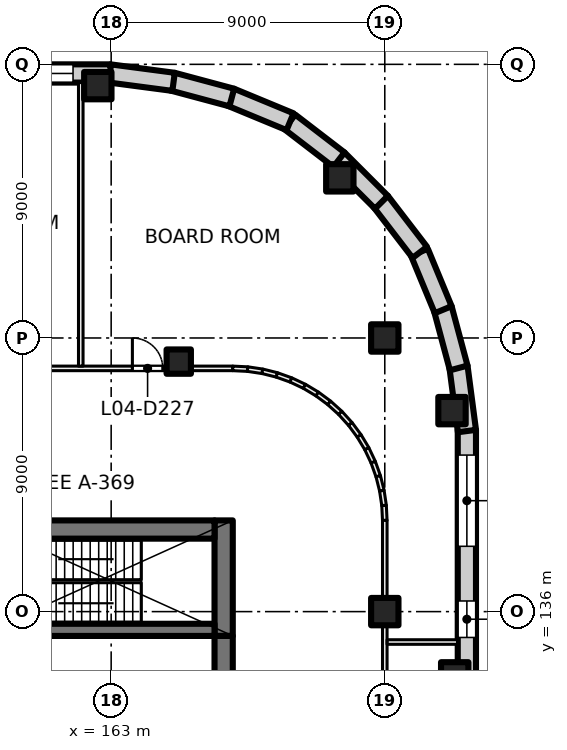
"""IFC4 building model, lengths in metres.
Left out: names, types, materials, properties, quantities, classifications, styles, units other than length and angle.
Written with IfcOpenShell. Run it as: python <this file> out.ifc"""

import sys

from ifc_helpers import new_model, si_unit, direction, frame, frame_2d, origin, origin_2d, place, context, subcontext, project, spatial, rectangle, extrude, element, fill, save


model = new_model("IFC4")
c1 = context("Model", 3, precision=1e-05, world=origin(), true_north=direction((0.0, 1.0)))
c2 = subcontext(c1, "Body", "Model", "MODEL_VIEW")
j1 = project(units=[si_unit("LENGTHUNIT", "METRE"), si_unit("PLANEANGLEUNIT", "RADIAN")], contexts=[c1])
p1 = place(None, origin())
s1 = spatial("IfcSite", under=j1, at=p1, CompositionType="ELEMENT")
p2 = place(p1, origin())
s2 = spatial("IfcBuilding", under=s1, at=p2, CompositionType="ELEMENT")
p3 = place(p2, frame((0.0, 0.0, 22.5)))
s3 = spatial("IfcBuildingStorey", under=s2, at=p3, CompositionType="ELEMENT", Elevation=22.5)
for number, where, z_axis, x_axis in (
    (1, (172.0, 136.0, 0.0), (0.0, 0.0, 1.0), (1.0, 0.0, 0.0)),
    (2, (172.0, 145.0, 0.0), (0.0, 0.0, 1.0), (1.0, 0.0, 0.0)),
    (3, (162.561, 153.3, 0.0), (0.0, 0.0, 1.0), (1.0, 0.0, 0.0)),
    (4, (170.521, 150.267, 0.0), (0.0, 0.0, 1.0), (1.0, 0.0, 0.0)),
    (5, (174.211, 142.611, 0.0), (0.0, 0.0, 1.0), (1.0, 0.0, 0.0)),
    (6, (174.3, 133.887, 0.0), (0.0, 0.0, 1.0), (1.0, 0.0, 0.0)),
):
    element("IfcColumn", number, at=place(p3, frame(where, z_axis=z_axis, x_axis=x_axis)), inside=s3, PredefinedType="COLUMN", context=c2, shape_type="SweptSolid", body=[
        extrude(rectangle(XDim=0.9, YDim=0.9, at=origin_2d()), origin(), (0.0, 0.0, 1.0), 5.0),
    ])
p4 = place(p3, frame((165.223, 144.223, 0.0), z_axis=(0.0, 0.0, 1.0), x_axis=(1.0, 0.0, 0.0)))
e7 = element("IfcColumn", 7, at=p4, inside=s3, PredefinedType="COLUMN", context=c2, shape_type="SweptSolid", body=[
    extrude(rectangle(XDim=0.8, YDim=0.8, at=origin_2d()), origin(), (0.0, 0.0, 1.0), 5.0),
])
p5 = place(p3, frame((166.7, 139.0, 0.0), z_axis=(0.0, 0.0, 1.0), x_axis=(0.0, -1.0, 0.0)))
e8 = element("IfcWall", 8, at=p5, inside=s3, PredefinedType="SHEAR", context=c2, shape_type="SweptSolid", body=[
    extrude(rectangle(XDim=3.8, YDim=0.6, at=frame_2d((1.9, 0.0))), origin(), (0.0, 0.0, 1.0), 5.0),
])
p6 = place(p3, frame((166.7, 135.2, 0.0), z_axis=(0.0, 0.0, 1.0), x_axis=(0.0, -1.0, 0.0)))
e9 = element("IfcWall", 9, at=p6, inside=s3, PredefinedType="SHEAR", context=c2, shape_type="SweptSolid", body=[
    extrude(rectangle(XDim=14.4, YDim=0.6, at=frame_2d((7.2, 0.0))), origin(), (0.0, 0.0, 1.0), 5.0),
])
p7 = place(p3, frame((166.4, 138.7, 0.0), z_axis=(0.0, 0.0, 1.0), x_axis=(-1.0, 0.0, 0.0)))
e10 = element("IfcWall", 10, at=p7, inside=s3, PredefinedType="SHEAR", context=c2, shape_type="SweptSolid", body=[
    extrude(rectangle(XDim=7.8, YDim=0.6, at=frame_2d((3.9, 0.0))), origin(), (0.0, 0.0, 1.0), 5.0),
])
p8 = place(p3, frame((166.4, 135.4, 0.0), z_axis=(0.0, 0.0, 1.0), x_axis=(-1.0, 0.0, 0.0)))
e11 = element("IfcWall", 11, at=p8, inside=s3, PredefinedType="SHEAR", context=c2, shape_type="SweptSolid", body=[
    extrude(rectangle(XDim=7.8, YDim=0.4, at=frame_2d((3.9, 0.0))), origin(), (0.0, 0.0, 1.0), 5.0),
])
p9 = place(p3, frame((174.7, 141.978, 0.0), z_axis=(0.0, 0.0, 1.0), x_axis=(0.0, -1.0, 0.0)))
e12 = element("IfcWall", 12, at=p9, inside=s3, PredefinedType="SOLIDWALL", context=c2, shape_type="SweptSolid", body=[
    extrude(rectangle(XDim=27.957, YDim=0.6, at=frame_2d((13.978, 0.0))), origin(), (0.0, 0.0, 1.0), 4.625),
])
p10 = place(p9, frame((0.83, 0.0, 0.9)))
e13 = element("IfcOpeningElement", 13, at=p10, cuts=e12, PredefinedType="OPENING", context=c2, shape_type="SweptSolid", body=[
    extrude(rectangle(XDim=3.0, YDim=3.0, at=frame_2d((1.5, 1.5))), frame((0.0, 0.31, 0.0), z_axis=(0.0, -1.0, 0.0), x_axis=(1.0, 0.0, 0.0)), (0.0, 0.0, 1.0), 0.62),
])
p11 = place(p9, frame((5.628, 0.0, 0.9)))
e14 = element("IfcOpeningElement", 14, at=p11, cuts=e12, PredefinedType="OPENING", context=c2, shape_type="SweptSolid", body=[
    extrude(rectangle(XDim=1.2, YDim=3.0, at=frame_2d((0.6, 1.5))), frame((0.0, 0.31, 0.0), z_axis=(0.0, -1.0, 0.0), x_axis=(1.0, 0.0, 0.0)), (0.0, 0.0, 1.0), 0.62),
])
p12 = place(p9, frame((10.148, 0.0, 0.9)))
e15 = element("IfcOpeningElement", 15, at=p12, cuts=e12, PredefinedType="OPENING", context=c2, shape_type="SweptSolid", body=[
    extrude(rectangle(XDim=3.0, YDim=3.0, at=frame_2d((1.5, 1.5))), frame((0.0, 0.31, 0.0), z_axis=(0.0, -1.0, 0.0), x_axis=(1.0, 0.0, 0.0)), (0.0, 0.0, 1.0), 0.62),
])
p13 = place(p9, frame((19.467, 0.0, 0.9)))
e16 = element("IfcOpeningElement", 16, at=p13, cuts=e12, PredefinedType="OPENING", context=c2, shape_type="SweptSolid", body=[
    extrude(rectangle(XDim=3.0, YDim=3.0, at=frame_2d((1.5, 1.5))), frame((0.0, 0.31, 0.0), z_axis=(0.0, -1.0, 0.0), x_axis=(1.0, 0.0, 0.0)), (0.0, 0.0, 1.0), 0.62),
])
p14 = place(p3, frame((174.424, 144.052, 0.0), z_axis=(0.0, 0.0, 1.0), x_axis=(0.130558200013, -0.991440646942, 0.0)))
e17 = element("IfcWall", 17, at=p14, inside=s3, PredefinedType="SOLIDWALL", context=c2, shape_type="SweptSolid", body=[
    extrude(rectangle(XDim=2.132, YDim=0.6, at=frame_2d((1.066, 0.0))), origin(), (0.0, 0.0, 1.0), 4.625),
])
p15 = place(p3, frame((173.908, 145.968, 0.0), z_axis=(0.0, 0.0, 1.0), x_axis=(0.258804467146, -0.965929732323, 0.0)))
e18 = element("IfcWall", 18, at=p15, inside=s3, PredefinedType="SOLIDWALL", context=c2, shape_type="SweptSolid", body=[
    extrude(rectangle(XDim=2.022, YDim=0.6, at=frame_2d((1.011, 0.0))), origin(), (0.0, 0.0, 1.0), 4.625),
])
p16 = place(p3, frame((173.14, 147.819, 0.0), z_axis=(0.0, 0.0, 1.0), x_axis=(0.382341242798, -0.924021197839, 0.0)))
e19 = element("IfcWall", 19, at=p16, inside=s3, PredefinedType="SOLIDWALL", context=c2, shape_type="SweptSolid", body=[
    extrude(rectangle(XDim=2.044, YDim=0.6, at=frame_2d((1.022, 0.0))), origin(), (0.0, 0.0, 1.0), 4.625),
])
p17 = place(p3, frame((171.865, 149.493, 0.0), z_axis=(0.0, 0.0, 1.0), x_axis=(0.609052002567, -0.79313029079, 0.0)))
e20 = element("IfcWall", 20, at=p17, inside=s3, PredefinedType="SOLIDWALL", context=c2, shape_type="SweptSolid", body=[
    extrude(rectangle(XDim=2.114, YDim=0.6, at=frame_2d((1.057, 0.0))), origin(), (0.0, 0.0, 1.0), 4.625),
])
p18 = place(p3, frame((170.463, 150.89, 0.0), z_axis=(0.0, 0.0, 1.0), x_axis=(0.707106781187, -0.707106781187, 0.0)))
e21 = element("IfcWall", 21, at=p18, inside=s3, PredefinedType="SOLIDWALL", context=c2, shape_type="SweptSolid", body=[
    extrude(rectangle(XDim=2.018, YDim=0.6, at=frame_2d((1.009, 0.0))), origin(), (0.0, 0.0, 1.0), 4.625),
])
p19 = place(p3, frame((168.872, 152.109, 0.0), z_axis=(0.0, 0.0, 1.0), x_axis=(0.793125485267, -0.609058260448, 0.0)))
e22 = element("IfcWall", 22, at=p19, inside=s3, PredefinedType="SOLIDWALL", context=c2, shape_type="SweptSolid", body=[
    extrude(rectangle(XDim=2.044, YDim=0.6, at=frame_2d((1.022, 0.0))), origin(), (0.0, 0.0, 1.0), 4.625),
])
p20 = place(p3, frame((166.931, 152.921, 0.0), z_axis=(0.0, 0.0, 1.0), x_axis=(0.924006983526, -0.382375593358, 0.0)))
e23 = element("IfcWall", 23, at=p20, inside=s3, PredefinedType="SOLIDWALL", context=c2, shape_type="SweptSolid", body=[
    extrude(rectangle(XDim=2.114, YDim=0.6, at=frame_2d((1.057, 0.0))), origin(), (0.0, 0.0, 1.0), 4.625),
])
p21 = place(p3, frame((165.014, 153.432, 0.0), z_axis=(0.0, 0.0, 1.0), x_axis=(0.965929732323, -0.258804467146, 0.0)))
e24 = element("IfcWall", 24, at=p21, inside=s3, PredefinedType="SOLIDWALL", context=c2, shape_type="SweptSolid", body=[
    extrude(rectangle(XDim=2.022, YDim=0.6, at=frame_2d((1.011, 0.0))), origin(), (0.0, 0.0, 1.0), 4.625),
])
p22 = place(p3, frame((162.939, 153.703, 0.0), z_axis=(0.0, 0.0, 1.0), x_axis=(0.991440646942, -0.130558200013, 0.0)))
e25 = element("IfcWall", 25, at=p22, inside=s3, PredefinedType="SOLIDWALL", context=c2, shape_type="SweptSolid", body=[
    extrude(rectangle(XDim=2.132, YDim=0.6, at=frame_2d((1.066, 0.0))), origin(), (0.0, 0.0, 1.0), 4.625),
])
p23 = place(p3, frame((131.022, 153.7, 0.0), z_axis=(0.0, 0.0, 1.0), x_axis=(1.0, 0.0, 0.0)))
e26 = element("IfcWall", 26, at=p23, inside=s3, PredefinedType="SOLIDWALL", context=c2, shape_type="SweptSolid", body=[
    extrude(rectangle(XDim=31.957, YDim=0.6, at=frame_2d((15.978, 0.0))), origin(), (0.0, 0.0, 1.0), 4.625),
])
p24 = place(p23, frame((0.783, 0.0, 0.9)))
e27 = element("IfcOpeningElement", 27, at=p24, cuts=e26, PredefinedType="OPENING", context=c2, shape_type="SweptSolid", body=[
    extrude(rectangle(XDim=3.0, YDim=3.0, at=frame_2d((1.5, 1.5))), frame((0.0, 0.31, 0.0), z_axis=(0.0, -1.0, 0.0), x_axis=(1.0, 0.0, 0.0)), (0.0, 0.0, 1.0), 0.62),
])
p25 = place(p23, frame((9.913, 0.0, 0.9)))
e28 = element("IfcOpeningElement", 28, at=p25, cuts=e26, PredefinedType="OPENING", context=c2, shape_type="SweptSolid", body=[
    extrude(rectangle(XDim=3.0, YDim=3.0, at=frame_2d((1.5, 1.5))), frame((0.0, 0.31, 0.0), z_axis=(0.0, -1.0, 0.0), x_axis=(1.0, 0.0, 0.0)), (0.0, 0.0, 1.0), 0.62),
])
p26 = place(p23, frame((14.928, 0.0, 0.9)))
e29 = element("IfcOpeningElement", 29, at=p26, cuts=e26, PredefinedType="OPENING", context=c2, shape_type="SweptSolid", body=[
    extrude(rectangle(XDim=3.0, YDim=3.0, at=frame_2d((1.5, 1.5))), frame((0.0, 0.31, 0.0), z_axis=(0.0, -1.0, 0.0), x_axis=(1.0, 0.0, 0.0)), (0.0, 0.0, 1.0), 0.62),
])
p27 = place(p23, frame((19.043, 0.0, 0.9)))
e30 = element("IfcOpeningElement", 30, at=p27, cuts=e26, PredefinedType="OPENING", context=c2, shape_type="SweptSolid", body=[
    extrude(rectangle(XDim=3.0, YDim=3.0, at=frame_2d((1.5, 1.5))), frame((0.0, 0.31, 0.0), z_axis=(0.0, -1.0, 0.0), x_axis=(1.0, 0.0, 0.0)), (0.0, 0.0, 1.0), 0.62),
])
p28 = place(p23, frame((23.609, 0.0, 0.9)))
e31 = element("IfcOpeningElement", 31, at=p28, cuts=e26, PredefinedType="OPENING", context=c2, shape_type="SweptSolid", body=[
    extrude(rectangle(XDim=3.0, YDim=3.0, at=frame_2d((1.5, 1.5))), frame((0.0, 0.31, 0.0), z_axis=(0.0, -1.0, 0.0), x_axis=(1.0, 0.0, 0.0)), (0.0, 0.0, 1.0), 0.62),
])
p29 = place(p23, frame((27.724, 0.0, 0.9)))
e32 = element("IfcOpeningElement", 32, at=p29, cuts=e26, PredefinedType="OPENING", context=c2, shape_type="SweptSolid", body=[
    extrude(rectangle(XDim=3.0, YDim=3.0, at=frame_2d((1.5, 1.5))), frame((0.0, 0.31, 0.0), z_axis=(0.0, -1.0, 0.0), x_axis=(1.0, 0.0, 0.0)), (0.0, 0.0, 1.0), 0.62),
])
p30 = place(p3, frame((154.075, 144.0, 0.0), z_axis=(0.0, 0.0, 1.0), x_axis=(1.0, 0.0, 0.0)))
e33 = element("IfcWall", 33, at=p30, inside=s3, PredefinedType="PARTITIONING", context=c2, shape_type="SweptSolid", body=[
    extrude(rectangle(XDim=12.927, YDim=0.15, at=frame_2d((6.463, 0.0))), origin(), (0.0, 0.0, 1.0), 4.625),
])
p31 = place(p30, frame((2.427, 0.0, 0.0)))
e34 = element("IfcOpeningElement", 34, at=p31, cuts=e33, PredefinedType="OPENING", context=c2, shape_type="SweptSolid", body=[
    extrude(rectangle(XDim=1.0, YDim=2.1, at=frame_2d((0.5, 1.05))), frame((0.0, 0.085, 0.0), z_axis=(0.0, -1.0, 0.0), x_axis=(1.0, 0.0, 0.0)), (0.0, 0.0, 1.0), 0.17),
])
p32 = place(p30, frame((9.623, 0.0, 0.0)))
e35 = element("IfcOpeningElement", 35, at=p32, cuts=e33, PredefinedType="OPENING", context=c2, shape_type="SweptSolid", body=[
    extrude(rectangle(XDim=1.0, YDim=2.1, at=frame_2d((0.5, 1.05))), frame((0.0, 0.085, 0.0), z_axis=(0.0, -1.0, 0.0), x_axis=(1.0, 0.0, 0.0)), (0.0, 0.0, 1.0), 0.17),
])
p33 = place(p3, frame((162.0, 144.075, 0.0), z_axis=(0.0, 0.0, 1.0), x_axis=(0.0, 1.0, 0.0)))
e36 = element("IfcWall", 36, at=p33, inside=s3, PredefinedType="PARTITIONING", context=c2, shape_type="SweptSolid", body=[
    extrude(rectangle(XDim=9.325, YDim=0.15, at=frame_2d((4.663, 0.0))), origin(), (0.0, 0.0, 1.0), 4.625),
])
p34 = place(p3, frame((166.998, 144.0, 0.0), z_axis=(0.0, 0.0, 1.0), x_axis=(0.998837896651, -0.048196018647, 0.0)))
e37 = element("IfcWall", 37, at=p34, inside=s3, PredefinedType="PARTITIONING", context=c2, shape_type="SweptSolid", body=[
    extrude(rectangle(XDim=0.496, YDim=0.15, at=frame_2d((0.248, 0.0))), origin(), (0.0, 0.0, 1.0), 4.625),
])
p35 = place(p3, frame((167.486, 143.977, 0.0), z_axis=(0.0, 0.0, 1.0), x_axis=(0.988925572052, -0.148412307247, 0.0)))
e38 = element("IfcWall", 38, at=p35, inside=s3, PredefinedType="PARTITIONING", context=c2, shape_type="SweptSolid", body=[
    extrude(rectangle(XDim=0.499, YDim=0.15, at=frame_2d((0.249, 0.0))), origin(), (0.0, 0.0, 1.0), 4.625),
])
p36 = place(p3, frame((167.971, 143.905, 0.0), z_axis=(0.0, 0.0, 1.0), x_axis=(0.970113715952, -0.242650732785, 0.0)))
e39 = element("IfcWall", 39, at=p36, inside=s3, PredefinedType="PARTITIONING", context=c2, shape_type="SweptSolid", body=[
    extrude(rectangle(XDim=0.499, YDim=0.15, at=frame_2d((0.25, 0.0))), origin(), (0.0, 0.0, 1.0), 4.625),
])
for number, where, z_axis, x_axis in (
    (40, (168.447, 143.786, 0.0), (0.0, 0.0, 1.0), (0.941, -0.337, 0.0)),
    (41, (168.91, 143.621, 0.0), (0.0, 0.0, 1.0), (0.904, -0.428, 0.0)),
):
    element("IfcWall", number, at=place(p3, frame(where, z_axis=z_axis, x_axis=x_axis)), inside=s3, PredefinedType="PARTITIONING", context=c2, shape_type="SweptSolid", body=[
        extrude(rectangle(XDim=0.498, YDim=0.15, at=frame_2d((0.249, 0.0))), origin(), (0.0, 0.0, 1.0), 4.625),
    ])
p37 = place(p3, frame((169.354, 143.412, 0.0), z_axis=(0.0, 0.0, 1.0), x_axis=(0.85671397893, -0.515791778052, 0.0)))
e42 = element("IfcWall", 42, at=p37, inside=s3, PredefinedType="PARTITIONING", context=c2, shape_type="SweptSolid", body=[
    extrude(rectangle(XDim=0.499, YDim=0.15, at=frame_2d((0.249, 0.0))), origin(), (0.0, 0.0, 1.0), 4.625),
])
p38 = place(p3, frame((169.775, 143.159, 0.0), z_axis=(0.0, 0.0, 1.0), x_axis=(0.80404358372, -0.594570362092, 0.0)))
e43 = element("IfcWall", 43, at=p38, inside=s3, PredefinedType="PARTITIONING", context=c2, shape_type="SweptSolid", body=[
    extrude(rectangle(XDim=0.498, YDim=0.15, at=frame_2d((0.249, 0.0))), origin(), (0.0, 0.0, 1.0), 4.625),
])
for number, where, z_axis, x_axis in (
    (44, (170.169, 142.867, 0.0), (0.0, 0.0, 1.0), (0.742, -0.67, 0.0)),
    (45, (170.533, 142.539, 0.0), (0.0, 0.0, 1.0), (0.67, -0.742, 0.0)),
):
    element("IfcWall", number, at=place(p3, frame(where, z_axis=z_axis, x_axis=x_axis)), inside=s3, PredefinedType="PARTITIONING", context=c2, shape_type="SweptSolid", body=[
        extrude(rectangle(XDim=0.499, YDim=0.15, at=frame_2d((0.249, 0.0))), origin(), (0.0, 0.0, 1.0), 4.625),
    ])
p39 = place(p3, frame((170.863, 142.175, 0.0), z_axis=(0.0, 0.0, 1.0), x_axis=(0.594570362092, -0.80404358372, 0.0)))
e46 = element("IfcWall", 46, at=p39, inside=s3, PredefinedType="PARTITIONING", context=c2, shape_type="SweptSolid", body=[
    extrude(rectangle(XDim=0.498, YDim=0.15, at=frame_2d((0.249, 0.0))), origin(), (0.0, 0.0, 1.0), 4.625),
])
p40 = place(p3, frame((171.155, 141.781, 0.0), z_axis=(0.0, 0.0, 1.0), x_axis=(0.515791778052, -0.85671397893, 0.0)))
e47 = element("IfcWall", 47, at=p40, inside=s3, PredefinedType="PARTITIONING", context=c2, shape_type="SweptSolid", body=[
    extrude(rectangle(XDim=0.499, YDim=0.15, at=frame_2d((0.249, 0.0))), origin(), (0.0, 0.0, 1.0), 4.625),
])
for number, where, z_axis, x_axis in (
    (48, (171.408, 141.36, 0.0), (0.0, 0.0, 1.0), (0.428, -0.904, 0.0)),
    (49, (171.618, 140.916, 0.0), (0.0, 0.0, 1.0), (0.337, -0.941, 0.0)),
):
    element("IfcWall", number, at=place(p3, frame(where, z_axis=z_axis, x_axis=x_axis)), inside=s3, PredefinedType="PARTITIONING", context=c2, shape_type="SweptSolid", body=[
        extrude(rectangle(XDim=0.498, YDim=0.15, at=frame_2d((0.249, 0.0))), origin(), (0.0, 0.0, 1.0), 4.625),
    ])
p41 = place(p3, frame((171.784, 140.455, 0.0), z_axis=(0.0, 0.0, 1.0), x_axis=(0.242650732785, -0.970113715952, 0.0)))
e50 = element("IfcWall", 50, at=p41, inside=s3, PredefinedType="PARTITIONING", context=c2, shape_type="SweptSolid", body=[
    extrude(rectangle(XDim=0.499, YDim=0.15, at=frame_2d((0.25, 0.0))), origin(), (0.0, 0.0, 1.0), 4.625),
])
p42 = place(p3, frame((171.903, 139.979, 0.0), z_axis=(0.0, 0.0, 1.0), x_axis=(0.148412307247, -0.988925572052, 0.0)))
e51 = element("IfcWall", 51, at=p42, inside=s3, PredefinedType="PARTITIONING", context=c2, shape_type="SweptSolid", body=[
    extrude(rectangle(XDim=0.499, YDim=0.15, at=frame_2d((0.249, 0.0))), origin(), (0.0, 0.0, 1.0), 4.625),
])
p43 = place(p3, frame((171.976, 139.494, 0.0), z_axis=(0.0, 0.0, 1.0), x_axis=(0.048196018647, -0.998837896651, 0.0)))
e52 = element("IfcWall", 52, at=p43, inside=s3, PredefinedType="PARTITIONING", context=c2, shape_type="SweptSolid", body=[
    extrude(rectangle(XDim=0.496, YDim=0.15, at=frame_2d((0.248, 0.0))), origin(), (0.0, 0.0, 1.0), 4.625),
])
p44 = place(p3, frame((172.0, 139.002, 0.0), z_axis=(0.0, 0.0, 1.0), x_axis=(0.0, -1.0, 0.0)))
e53 = element("IfcWall", 53, at=p44, inside=s3, PredefinedType="PARTITIONING", context=c2, shape_type="SweptSolid", body=[
    extrude(rectangle(XDim=22.004, YDim=0.15, at=frame_2d((11.002, 0.0))), origin(), (0.0, 0.0, 1.0), 4.625),
])
p45 = place(p44, frame((12.5, 0.0, 0.0)))
e54 = element("IfcOpeningElement", 54, at=p45, cuts=e53, PredefinedType="OPENING", context=c2, shape_type="SweptSolid", body=[
    extrude(rectangle(XDim=1.0, YDim=2.1, at=frame_2d((0.5, 1.05))), frame((0.0, 0.085, 0.0), z_axis=(0.0, -1.0, 0.0), x_axis=(1.0, 0.0, 0.0)), (0.0, 0.0, 1.0), 0.17),
])
p46 = place(p3, frame((172.075, 135.0, 0.0), z_axis=(0.0, 0.0, 1.0), x_axis=(1.0, 0.0, 0.0)))
e55 = element("IfcWall", 55, at=p46, inside=s3, PredefinedType="PARTITIONING", context=c2, shape_type="SweptSolid", body=[
    extrude(rectangle(XDim=2.325, YDim=0.15, at=frame_2d((1.163, 0.0))), origin(), (0.0, 0.0, 1.0), 4.625),
])
p47 = place(p10, origin())
e56 = element("IfcWindow", 56, at=p47, inside=s3, PartitioningType="SINGLE_PANEL", PredefinedType="WINDOW", context=c2, shape_type="SweptSolid", body=[
    extrude(rectangle(XDim=3.0, YDim=3.0, at=frame_2d((1.5, 1.5))), frame((0.0, 0.03, 0.0), z_axis=(0.0, -1.0, 0.0), x_axis=(1.0, 0.0, 0.0)), (0.0, 0.0, 1.0), 0.06),
])
fill(e13, e56)
p48 = place(p11, origin())
e57 = element("IfcWindow", 57, at=p48, inside=s3, PartitioningType="SINGLE_PANEL", PredefinedType="WINDOW", context=c2, shape_type="SweptSolid", body=[
    extrude(rectangle(XDim=1.2, YDim=3.0, at=frame_2d((0.6, 1.5))), frame((0.0, 0.03, 0.0), z_axis=(0.0, -1.0, 0.0), x_axis=(1.0, 0.0, 0.0)), (0.0, 0.0, 1.0), 0.06),
])
fill(e14, e57)
p49 = place(p29, origin())
e58 = element("IfcWindow", 58, at=p49, inside=s3, PartitioningType="SINGLE_PANEL", PredefinedType="WINDOW", context=c2, shape_type="SweptSolid", body=[
    extrude(rectangle(XDim=3.0, YDim=3.0, at=frame_2d((1.5, 1.5))), frame((0.0, 0.03, 0.0), z_axis=(0.0, -1.0, 0.0), x_axis=(1.0, 0.0, 0.0)), (0.0, 0.0, 1.0), 0.06),
])
fill(e32, e58)
p50 = place(p32, origin())
e59 = element("IfcDoor", 59, at=p50, inside=s3, OperationType="SINGLE_SWING_LEFT", PredefinedType="DOOR", context=c2, shape_type="SweptSolid", body=[
    extrude(rectangle(XDim=1.0, YDim=2.1, at=frame_2d((0.5, 1.05))), frame((0.0, 0.025, 0.0), z_axis=(0.0, -1.0, 0.0), x_axis=(1.0, 0.0, 0.0)), (0.0, 0.0, 1.0), 0.05),
])
fill(e35, e59)
save(model, sys.argv[1])
